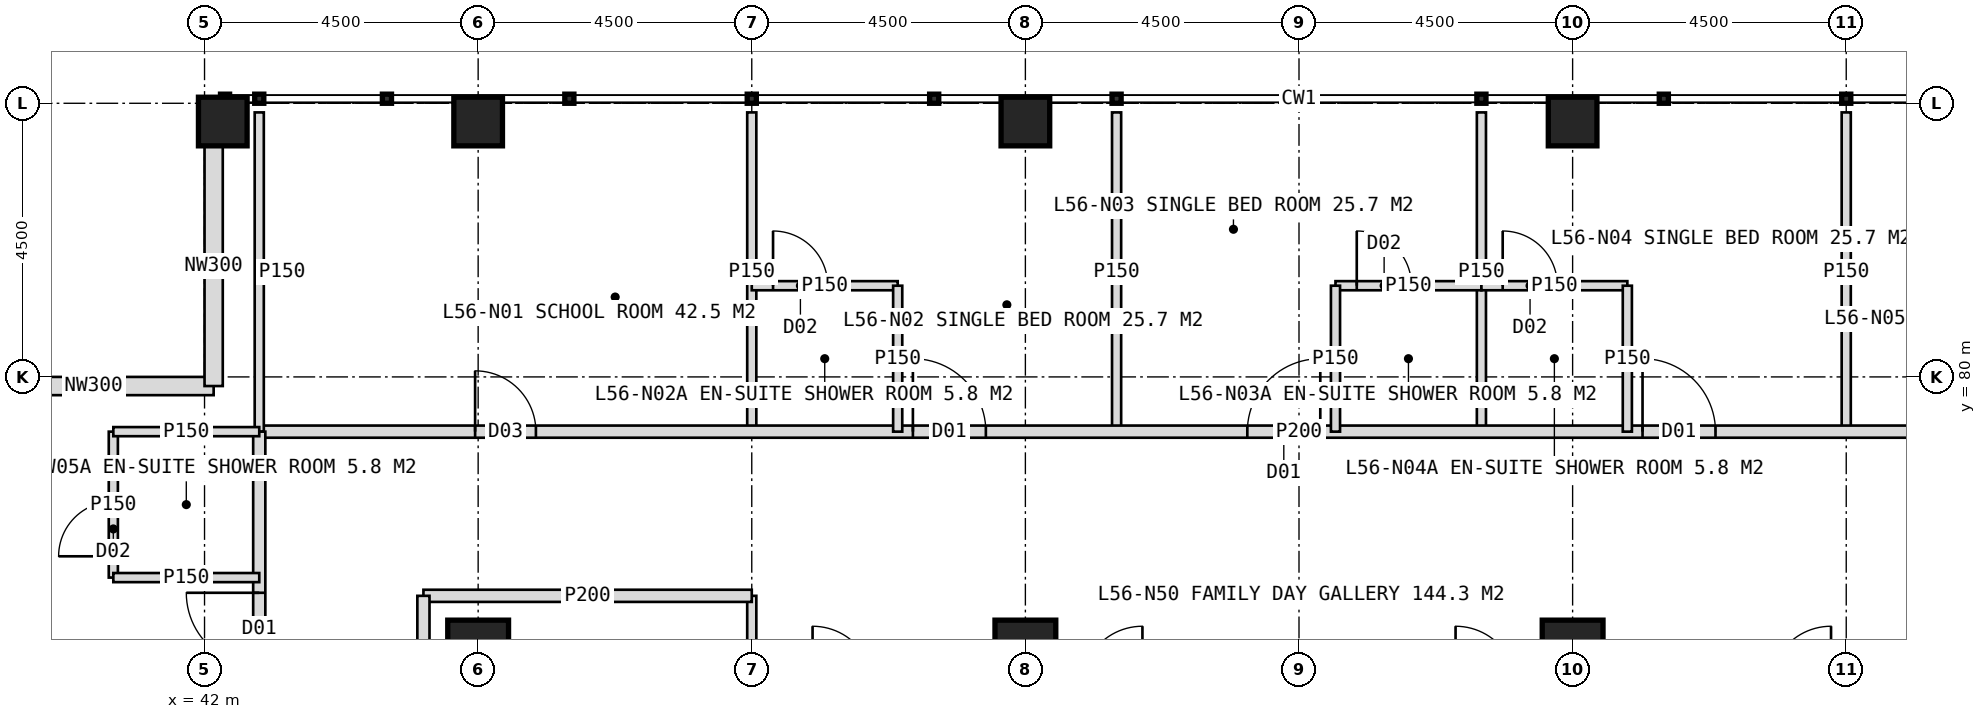
"""IFC4 building model, lengths in metres.
Left out: names, types, materials, properties, quantities, classifications, styles, units other than length and angle.
Written with IfcOpenShell. Run it as: python <this file> out.ifc"""

import sys

from ifc_helpers import new_model, si_unit, direction, frame, frame_2d, origin, origin_2d, place, context, subcontext, project, spatial, rectangle, hollow_rectangle, extrude, element, fill, save


model = new_model("IFC4")
c1 = context("Model", 3, precision=1e-05, world=origin(), true_north=direction((0.0, 1.0)))
c2 = subcontext(c1, "Body", "Model", "MODEL_VIEW")
j1 = project(units=[si_unit("LENGTHUNIT", "METRE"), si_unit("PLANEANGLEUNIT", "RADIAN")], contexts=[c1])
p1 = place(None, origin())
s1 = spatial("IfcSite", under=j1, at=p1, CompositionType="ELEMENT")
p2 = place(p1, origin())
s2 = spatial("IfcBuilding", under=s1, at=p2, CompositionType="ELEMENT")
p3 = place(p2, frame((0.0, 0.0, 233.0)))
s3 = spatial("IfcBuildingStorey", under=s2, at=p3, CompositionType="ELEMENT", Elevation=233.0)
for number, where, z_axis, x_axis in (
    (1, (46.5, 75.5, 0.0), (0.0, 0.0, 1.0), (1.0, 0.0, 0.0)),
    (2, (55.5, 75.5, 0.0), (0.0, 0.0, 1.0), (1.0, 0.0, 0.0)),
    (3, (64.5, 75.5, 0.0), (0.0, 0.0, 1.0), (1.0, 0.0, 0.0)),
):
    element("IfcColumn", number, at=place(p3, frame(where, z_axis=z_axis, x_axis=x_axis)), inside=s3, PredefinedType="COLUMN", context=c2, shape_type="SweptSolid", body=[
        extrude(hollow_rectangle(XDim=1.0, YDim=1.0, WallThickness=0.1, at=origin_2d()), origin(), (0.0, 0.0, 1.0), 4.0),
    ])
for number, where, z_axis, x_axis in (
    (4, (42.3, 84.2, 0.0), (0.0, 0.0, 1.0), (1.0, 0.0, 0.0)),
    (5, (46.5, 84.2, 0.0), (0.0, 0.0, 1.0), (1.0, 0.0, 0.0)),
    (6, (55.5, 84.2, 0.0), (0.0, 0.0, 1.0), (1.0, 0.0, 0.0)),
    (7, (64.5, 84.2, 0.0), (0.0, 0.0, 1.0), (1.0, 0.0, 0.0)),
):
    element("IfcColumn", number, at=place(p3, frame(where, z_axis=z_axis, x_axis=x_axis)), inside=s3, PredefinedType="COLUMN", context=c2, shape_type="SweptSolid", body=[
        extrude(hollow_rectangle(XDim=0.8, YDim=0.8, WallThickness=0.08, at=origin_2d()), origin(), (0.0, 0.0, 1.0), 4.0),
    ])
for number, where, z_axis, x_axis in (
    (8, (38.2, 79.85, 0.0), (0.0, 0.0, 1.0), (1.0, 0.0, 0.0)),
    (9, (42.15, 79.85, 0.0), (0.0, 0.0, 1.0), (0.0, 1.0, 0.0)),
):
    element("IfcWall", number, at=place(p3, frame(where, z_axis=z_axis, x_axis=x_axis)), inside=s3, PredefinedType="ELEMENTEDWALL", context=c2, shape_type="SweptSolid", body=[
        extrude(rectangle(XDim=3.95, YDim=0.3, at=frame_2d((1.975, 0.0))), origin(), (0.0, 0.0, 1.0), 2.85),
    ])
for number, where, z_axis, x_axis in (
    (10, (51.0, 79.1, 0.0), (0.0, 0.0, 1.0), (0.0, 1.0, 0.0)),
    (11, (57.0, 79.1, 0.0), (0.0, 0.0, 1.0), (0.0, 1.0, 0.0)),
    (12, (63.0, 79.1, 0.0), (0.0, 0.0, 1.0), (0.0, 1.0, 0.0)),
    (13, (69.0, 79.1, 0.0), (0.0, 0.0, 1.0), (0.0, 1.0, 0.0)),
):
    element("IfcWall", number, at=place(p3, frame(where, z_axis=z_axis, x_axis=x_axis)), inside=s3, PredefinedType="PARTITIONING", context=c2, shape_type="SweptSolid", body=[
        extrude(rectangle(XDim=5.25, YDim=0.15, at=frame_2d((2.625, 0.0))), origin(), (0.0, 0.0, 1.0), 3.75),
    ])
p4 = place(p3, frame((42.9, 79.1, 0.0), z_axis=(0.0, 0.0, 1.0), x_axis=(1.0, 0.0, 0.0)))
e14 = element("IfcWall", 14, at=p4, inside=s3, PredefinedType="PARTITIONING", context=c2, shape_type="SweptSolid", body=[
    extrude(rectangle(XDim=34.2, YDim=0.2, at=frame_2d((17.1, 0.0))), origin(), (0.0, 0.0, 1.0), 3.75),
])
p5 = place(p4, frame((3.55, 0.0, 0.0)))
e15 = element("IfcOpeningElement", 15, at=p5, cuts=e14, PredefinedType="OPENING", context=c2, shape_type="SweptSolid", body=[
    extrude(rectangle(XDim=1.0, YDim=2.1, at=frame_2d((0.5, 1.05))), frame((0.0, 0.11, 0.0), z_axis=(0.0, -1.0, 0.0), x_axis=(1.0, 0.0, 0.0)), (0.0, 0.0, 1.0), 0.22),
])
p6 = place(p4, frame((10.75, 0.0, 0.0)))
e16 = element("IfcOpeningElement", 16, at=p6, cuts=e14, PredefinedType="OPENING", context=c2, shape_type="SweptSolid", body=[
    extrude(rectangle(XDim=1.2, YDim=2.2, at=frame_2d((0.6, 1.1))), frame((0.0, 0.11, 0.0), z_axis=(0.0, -1.0, 0.0), x_axis=(1.0, 0.0, 0.0)), (0.0, 0.0, 1.0), 0.22),
])
p7 = place(p4, frame((16.25, 0.0, 0.0)))
e17 = element("IfcOpeningElement", 17, at=p7, cuts=e14, PredefinedType="OPENING", context=c2, shape_type="SweptSolid", body=[
    extrude(rectangle(XDim=1.2, YDim=2.2, at=frame_2d((0.6, 1.1))), frame((0.0, 0.11, 0.0), z_axis=(0.0, -1.0, 0.0), x_axis=(1.0, 0.0, 0.0)), (0.0, 0.0, 1.0), 0.22),
])
p8 = place(p4, frame((22.75, 0.0, 0.0)))
e18 = element("IfcOpeningElement", 18, at=p8, cuts=e14, PredefinedType="OPENING", context=c2, shape_type="SweptSolid", body=[
    extrude(rectangle(XDim=1.2, YDim=2.2, at=frame_2d((0.6, 1.1))), frame((0.0, 0.11, 0.0), z_axis=(0.0, -1.0, 0.0), x_axis=(1.0, 0.0, 0.0)), (0.0, 0.0, 1.0), 0.22),
])
p9 = place(p4, frame((29.75, 0.0, 0.0)))
e19 = element("IfcOpeningElement", 19, at=p9, cuts=e14, PredefinedType="OPENING", context=c2, shape_type="SweptSolid", body=[
    extrude(rectangle(XDim=1.2, YDim=2.2, at=frame_2d((0.6, 1.1))), frame((0.0, 0.11, 0.0), z_axis=(0.0, -1.0, 0.0), x_axis=(1.0, 0.0, 0.0)), (0.0, 0.0, 1.0), 0.22),
])
p10 = place(p3, frame((42.9, 79.1, 0.0), z_axis=(0.0, 0.0, 1.0), x_axis=(0.0, 1.0, 0.0)))
e20 = element("IfcWall", 20, at=p10, inside=s3, PredefinedType="PARTITIONING", context=c2, shape_type="SweptSolid", body=[
    extrude(rectangle(XDim=5.25, YDim=0.15, at=frame_2d((2.625, 0.0))), origin(), (0.0, 0.0, 1.0), 3.75),
])
p11 = place(p3, frame((51.0, 81.5, 0.0), z_axis=(0.0, 0.0, 1.0), x_axis=(1.0, 0.0, 0.0)))
e21 = element("IfcWall", 21, at=p11, inside=s3, PredefinedType="PARTITIONING", context=c2, shape_type="SweptSolid", body=[
    extrude(rectangle(XDim=2.4, YDim=0.15, at=frame_2d((1.2, 0.0))), origin(), (0.0, 0.0, 1.0), 3.75),
])
p12 = place(p11, frame((0.35, 0.0, 0.0)))
e22 = element("IfcOpeningElement", 22, at=p12, cuts=e21, PredefinedType="OPENING", context=c2, shape_type="SweptSolid", body=[
    extrude(rectangle(XDim=0.9, YDim=2.1, at=frame_2d((0.45, 1.05))), frame((0.0, 0.085, 0.0), z_axis=(0.0, -1.0, 0.0), x_axis=(1.0, 0.0, 0.0)), (0.0, 0.0, 1.0), 0.17),
])
p13 = place(p3, frame((53.4, 79.1, 0.0), z_axis=(0.0, 0.0, 1.0), x_axis=(0.0, 1.0, 0.0)))
e23 = element("IfcWall", 23, at=p13, inside=s3, PredefinedType="PARTITIONING", context=c2, shape_type="SweptSolid", body=[
    extrude(rectangle(XDim=2.4, YDim=0.15, at=frame_2d((1.2, 0.0))), origin(), (0.0, 0.0, 1.0), 3.75),
])
p14 = place(p3, frame((60.6, 81.5, 0.0), z_axis=(0.0, 0.0, 1.0), x_axis=(1.0, 0.0, 0.0)))
e24 = element("IfcWall", 24, at=p14, inside=s3, PredefinedType="PARTITIONING", context=c2, shape_type="SweptSolid", body=[
    extrude(rectangle(XDim=2.4, YDim=0.15, at=frame_2d((1.2, 0.0))), origin(), (0.0, 0.0, 1.0), 3.75),
])
p15 = place(p14, frame((0.35, 0.0, 0.0)))
e25 = element("IfcOpeningElement", 25, at=p15, cuts=e24, PredefinedType="OPENING", context=c2, shape_type="SweptSolid", body=[
    extrude(rectangle(XDim=0.9, YDim=2.1, at=frame_2d((0.45, 1.05))), frame((0.0, 0.085, 0.0), z_axis=(0.0, -1.0, 0.0), x_axis=(1.0, 0.0, 0.0)), (0.0, 0.0, 1.0), 0.17),
])
p16 = place(p3, frame((60.6, 79.1, 0.0), z_axis=(0.0, 0.0, 1.0), x_axis=(0.0, 1.0, 0.0)))
e26 = element("IfcWall", 26, at=p16, inside=s3, PredefinedType="PARTITIONING", context=c2, shape_type="SweptSolid", body=[
    extrude(rectangle(XDim=2.4, YDim=0.15, at=frame_2d((1.2, 0.0))), origin(), (0.0, 0.0, 1.0), 3.75),
])
p17 = place(p3, frame((63.0, 81.5, 0.0), z_axis=(0.0, 0.0, 1.0), x_axis=(1.0, 0.0, 0.0)))
e27 = element("IfcWall", 27, at=p17, inside=s3, PredefinedType="PARTITIONING", context=c2, shape_type="SweptSolid", body=[
    extrude(rectangle(XDim=2.4, YDim=0.15, at=frame_2d((1.2, 0.0))), origin(), (0.0, 0.0, 1.0), 3.75),
])
p18 = place(p17, frame((0.35, 0.0, 0.0)))
e28 = element("IfcOpeningElement", 28, at=p18, cuts=e27, PredefinedType="OPENING", context=c2, shape_type="SweptSolid", body=[
    extrude(rectangle(XDim=0.9, YDim=2.1, at=frame_2d((0.45, 1.05))), frame((0.0, 0.085, 0.0), z_axis=(0.0, -1.0, 0.0), x_axis=(1.0, 0.0, 0.0)), (0.0, 0.0, 1.0), 0.17),
])
p19 = place(p3, frame((65.4, 79.1, 0.0), z_axis=(0.0, 0.0, 1.0), x_axis=(0.0, 1.0, 0.0)))
e29 = element("IfcWall", 29, at=p19, inside=s3, PredefinedType="PARTITIONING", context=c2, shape_type="SweptSolid", body=[
    extrude(rectangle(XDim=2.4, YDim=0.15, at=frame_2d((1.2, 0.0))), origin(), (0.0, 0.0, 1.0), 3.75),
])
p20 = place(p3, frame((51.0, 71.0, 0.0), z_axis=(0.0, 0.0, 1.0), x_axis=(0.0, 1.0, 0.0)))
e30 = element("IfcWall", 30, at=p20, inside=s3, PredefinedType="PARTITIONING", context=c2, shape_type="SweptSolid", body=[
    extrude(rectangle(XDim=5.4, YDim=0.15, at=frame_2d((2.7, 0.0))), origin(), (0.0, 0.0, 1.0), 3.75),
])
p21 = place(p3, frame((45.6, 76.4, 0.0), z_axis=(0.0, 0.0, 1.0), x_axis=(1.0, 0.0, 0.0)))
e31 = element("IfcWall", 31, at=p21, inside=s3, PredefinedType="PARTITIONING", context=c2, shape_type="SweptSolid", body=[
    extrude(rectangle(XDim=5.4, YDim=0.2, at=frame_2d((2.7, 0.0))), origin(), (0.0, 0.0, 1.0), 3.75),
])
p22 = place(p3, frame((42.9, 44.9, 0.0), z_axis=(0.0, 0.0, 1.0), x_axis=(0.0, 1.0, 0.0)))
e32 = element("IfcWall", 32, at=p22, inside=s3, PredefinedType="PARTITIONING", context=c2, shape_type="SweptSolid", body=[
    extrude(rectangle(XDim=34.2, YDim=0.2, at=frame_2d((17.1, 0.0))), origin(), (0.0, 0.0, 1.0), 3.75),
])
p23 = place(p22, frame((1.25, 0.0, 0.0)))
e33 = element("IfcOpeningElement", 33, at=p23, cuts=e32, PredefinedType="OPENING", context=c2, shape_type="SweptSolid", body=[
    extrude(rectangle(XDim=1.2, YDim=2.2, at=frame_2d((0.6, 1.1))), frame((0.0, 0.11, 0.0), z_axis=(0.0, -1.0, 0.0), x_axis=(1.0, 0.0, 0.0)), (0.0, 0.0, 1.0), 0.22),
])
p24 = place(p22, frame((7.75, 0.0, 0.0)))
e34 = element("IfcOpeningElement", 34, at=p24, cuts=e32, PredefinedType="OPENING", context=c2, shape_type="SweptSolid", body=[
    extrude(rectangle(XDim=1.2, YDim=2.2, at=frame_2d((0.6, 1.1))), frame((0.0, 0.11, 0.0), z_axis=(0.0, -1.0, 0.0), x_axis=(1.0, 0.0, 0.0)), (0.0, 0.0, 1.0), 0.22),
])
p25 = place(p22, frame((13.6, 0.0, 0.0)))
e35 = element("IfcOpeningElement", 35, at=p25, cuts=e32, PredefinedType="OPENING", context=c2, shape_type="SweptSolid", body=[
    extrude(rectangle(XDim=1.0, YDim=2.1, at=frame_2d((0.5, 1.05))), frame((0.0, 0.11, 0.0), z_axis=(0.0, -1.0, 0.0), x_axis=(1.0, 0.0, 0.0)), (0.0, 0.0, 1.0), 0.22),
])
p26 = place(p22, frame((19.75, 0.0, 0.0)))
e36 = element("IfcOpeningElement", 36, at=p26, cuts=e32, PredefinedType="OPENING", context=c2, shape_type="SweptSolid", body=[
    extrude(rectangle(XDim=1.2, YDim=2.2, at=frame_2d((0.6, 1.1))), frame((0.0, 0.11, 0.0), z_axis=(0.0, -1.0, 0.0), x_axis=(1.0, 0.0, 0.0)), (0.0, 0.0, 1.0), 0.22),
])
p27 = place(p22, frame((30.35, 0.0, 0.0)))
e37 = element("IfcOpeningElement", 37, at=p27, cuts=e32, PredefinedType="OPENING", context=c2, shape_type="SweptSolid", body=[
    extrude(rectangle(XDim=1.2, YDim=2.2, at=frame_2d((0.6, 1.1))), frame((0.0, 0.11, 0.0), z_axis=(0.0, -1.0, 0.0), x_axis=(1.0, 0.0, 0.0)), (0.0, 0.0, 1.0), 0.22),
])
p28 = place(p3, frame((40.5, 76.7, 0.0), z_axis=(0.0, 0.0, 1.0), x_axis=(0.0, 1.0, 0.0)))
e38 = element("IfcWall", 38, at=p28, inside=s3, PredefinedType="PARTITIONING", context=c2, shape_type="SweptSolid", body=[
    extrude(rectangle(XDim=2.4, YDim=0.15, at=frame_2d((1.2, 0.0))), origin(), (0.0, 0.0, 1.0), 3.75),
])
p29 = place(p28, frame((0.35, 0.0, 0.0)))
e39 = element("IfcOpeningElement", 39, at=p29, cuts=e38, PredefinedType="OPENING", context=c2, shape_type="SweptSolid", body=[
    extrude(rectangle(XDim=0.9, YDim=2.1, at=frame_2d((0.45, 1.05))), frame((0.0, 0.085, 0.0), z_axis=(0.0, -1.0, 0.0), x_axis=(1.0, 0.0, 0.0)), (0.0, 0.0, 1.0), 0.17),
])
for number, where, z_axis, x_axis in (
    (40, (42.9, 76.7, 0.0), (0.0, 0.0, 1.0), (-1.0, 0.0, 0.0)),
    (41, (42.9, 79.1, 0.0), (0.0, 0.0, 1.0), (-1.0, 0.0, 0.0)),
):
    element("IfcWall", number, at=place(p3, frame(where, z_axis=z_axis, x_axis=x_axis)), inside=s3, PredefinedType="PARTITIONING", context=c2, shape_type="SweptSolid", body=[
        extrude(rectangle(XDim=2.4, YDim=0.15, at=frame_2d((1.2, 0.0))), origin(), (0.0, 0.0, 1.0), 3.75),
    ])
p30 = place(p3, frame((45.6, 62.0, 0.0), z_axis=(0.0, 0.0, 1.0), x_axis=(0.0, 1.0, 0.0)))
e42 = element("IfcWall", 42, at=p30, inside=s3, PredefinedType="PARTITIONING", context=c2, shape_type="SweptSolid", body=[
    extrude(rectangle(XDim=14.4, YDim=0.2, at=frame_2d((7.2, 0.0))), origin(), (0.0, 0.0, 1.0), 3.75),
])
p31 = place(p30, frame((2.5, 0.0, 0.0)))
e43 = element("IfcOpeningElement", 43, at=p31, cuts=e42, PredefinedType="OPENING", context=c2, shape_type="SweptSolid", body=[
    extrude(rectangle(XDim=1.0, YDim=2.1, at=frame_2d((0.5, 1.05))), frame((0.0, 0.11, 0.0), z_axis=(0.0, -1.0, 0.0), x_axis=(1.0, 0.0, 0.0)), (0.0, 0.0, 1.0), 0.22),
])
p32 = place(p30, frame((7.0, 0.0, 0.0)))
e44 = element("IfcOpeningElement", 44, at=p32, cuts=e42, PredefinedType="OPENING", context=c2, shape_type="SweptSolid", body=[
    extrude(rectangle(XDim=1.0, YDim=2.1, at=frame_2d((0.5, 1.05))), frame((0.0, 0.11, 0.0), z_axis=(0.0, -1.0, 0.0), x_axis=(1.0, 0.0, 0.0)), (0.0, 0.0, 1.0), 0.22),
])
p33 = place(p30, frame((11.2, 0.0, 0.0)))
e45 = element("IfcOpeningElement", 45, at=p33, cuts=e42, PredefinedType="OPENING", context=c2, shape_type="SweptSolid", body=[
    extrude(rectangle(XDim=1.0, YDim=2.1, at=frame_2d((0.5, 1.05))), frame((0.0, 0.11, 0.0), z_axis=(0.0, -1.0, 0.0), x_axis=(1.0, 0.0, 0.0)), (0.0, 0.0, 1.0), 0.22),
])
p34 = place(p5, origin())
e46 = element("IfcDoor", 46, at=p34, inside=s3, OperationType="SINGLE_SWING_LEFT", PredefinedType="DOOR", context=c2, shape_type="SweptSolid", body=[
    extrude(rectangle(XDim=1.0, YDim=2.1, at=frame_2d((0.5, 1.05))), frame((0.0, 0.025, 0.0), z_axis=(0.0, -1.0, 0.0), x_axis=(1.0, 0.0, 0.0)), (0.0, 0.0, 1.0), 0.05),
])
fill(e15, e46)
p35 = place(p6, origin())
e47 = element("IfcDoor", 47, at=p35, inside=s3, OperationType="SINGLE_SWING_LEFT", PredefinedType="DOOR", context=c2, shape_type="SweptSolid", body=[
    extrude(rectangle(XDim=1.2, YDim=2.2, at=frame_2d((0.6, 1.1))), frame((0.0, 0.025, 0.0), z_axis=(0.0, -1.0, 0.0), x_axis=(1.0, 0.0, 0.0)), (0.0, 0.0, 1.0), 0.05),
])
fill(e16, e47)
p36 = place(p12, origin())
e48 = element("IfcDoor", 48, at=p36, inside=s3, OperationType="SINGLE_SWING_LEFT", PredefinedType="DOOR", context=c2, shape_type="SweptSolid", body=[
    extrude(rectangle(XDim=0.9, YDim=2.1, at=frame_2d((0.45, 1.05))), frame((0.0, 0.025, 0.0), z_axis=(0.0, -1.0, 0.0), x_axis=(1.0, 0.0, 0.0)), (0.0, 0.0, 1.0), 0.05),
])
fill(e22, e48)
p37 = place(p7, origin())
e49 = element("IfcDoor", 49, at=p37, inside=s3, OperationType="SINGLE_SWING_RIGHT", PredefinedType="DOOR", context=c2, shape_type="SweptSolid", body=[
    extrude(rectangle(XDim=1.2, YDim=2.2, at=frame_2d((0.6, 1.1))), frame((0.0, 0.025, 0.0), z_axis=(0.0, -1.0, 0.0), x_axis=(1.0, 0.0, 0.0)), (0.0, 0.0, 1.0), 0.05),
])
fill(e17, e49)
p38 = place(p15, origin())
e50 = element("IfcDoor", 50, at=p38, inside=s3, OperationType="SINGLE_SWING_LEFT", PredefinedType="DOOR", context=c2, shape_type="SweptSolid", body=[
    extrude(rectangle(XDim=0.9, YDim=2.1, at=frame_2d((0.45, 1.05))), frame((0.0, 0.025, 0.0), z_axis=(0.0, -1.0, 0.0), x_axis=(1.0, 0.0, 0.0)), (0.0, 0.0, 1.0), 0.05),
])
fill(e25, e50)
p39 = place(p8, origin())
e51 = element("IfcDoor", 51, at=p39, inside=s3, OperationType="SINGLE_SWING_LEFT", PredefinedType="DOOR", context=c2, shape_type="SweptSolid", body=[
    extrude(rectangle(XDim=1.2, YDim=2.2, at=frame_2d((0.6, 1.1))), frame((0.0, 0.025, 0.0), z_axis=(0.0, -1.0, 0.0), x_axis=(1.0, 0.0, 0.0)), (0.0, 0.0, 1.0), 0.05),
])
fill(e18, e51)
p40 = place(p18, origin())
e52 = element("IfcDoor", 52, at=p40, inside=s3, OperationType="SINGLE_SWING_LEFT", PredefinedType="DOOR", context=c2, shape_type="SweptSolid", body=[
    extrude(rectangle(XDim=0.9, YDim=2.1, at=frame_2d((0.45, 1.05))), frame((0.0, 0.025, 0.0), z_axis=(0.0, -1.0, 0.0), x_axis=(1.0, 0.0, 0.0)), (0.0, 0.0, 1.0), 0.05),
])
fill(e28, e52)
p41 = place(p27, origin())
e53 = element("IfcDoor", 53, at=p41, inside=s3, OperationType="SINGLE_SWING_RIGHT", PredefinedType="DOOR", context=c2, shape_type="SweptSolid", body=[
    extrude(rectangle(XDim=1.2, YDim=2.2, at=frame_2d((0.6, 1.1))), frame((0.0, 0.025, 0.0), z_axis=(0.0, -1.0, 0.0), x_axis=(1.0, 0.0, 0.0)), (0.0, 0.0, 1.0), 0.05),
])
fill(e37, e53)
p42 = place(p29, origin())
e54 = element("IfcDoor", 54, at=p42, inside=s3, OperationType="SINGLE_SWING_LEFT", PredefinedType="DOOR", context=c2, shape_type="SweptSolid", body=[
    extrude(rectangle(XDim=0.9, YDim=2.1, at=frame_2d((0.45, 1.05))), frame((0.0, 0.025, 0.0), z_axis=(0.0, -1.0, 0.0), x_axis=(1.0, 0.0, 0.0)), (0.0, 0.0, 1.0), 0.05),
])
fill(e39, e54)
save(model, sys.argv[1])
